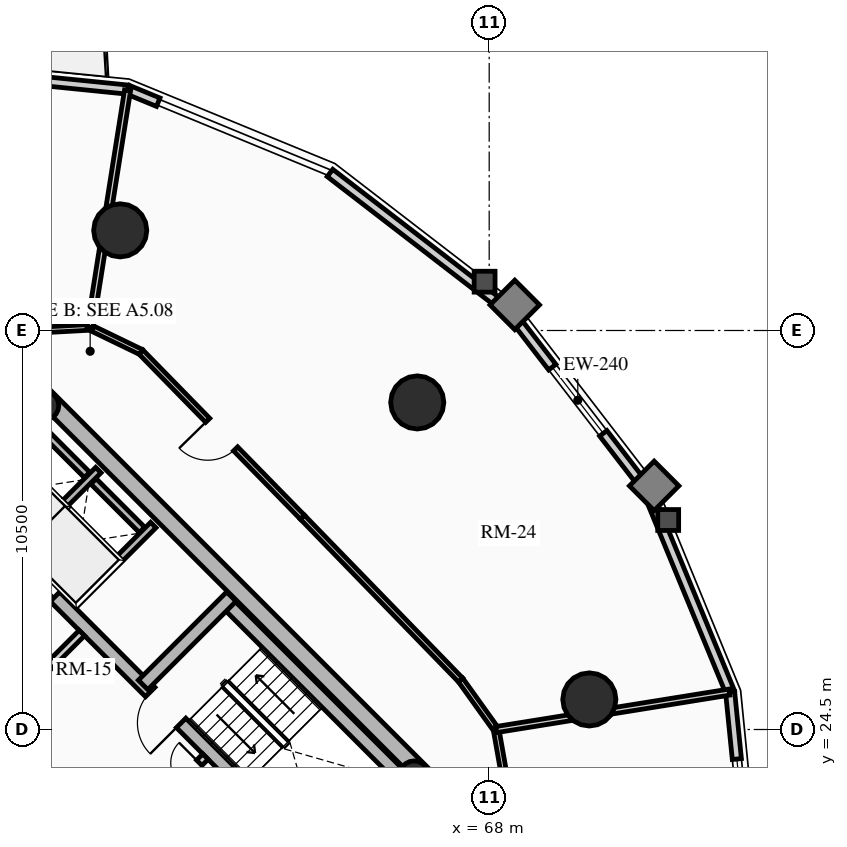
"""IFC4 building model, lengths in metres.
Left out: names, types, materials, properties, quantities, classifications, styles, units other than length and angle.
Written with IfcOpenShell. Run it as: python <this file> out.ifc"""

import sys

from ifc_helpers import new_model, si_unit, direction, frame, frame_2d, origin, origin_2d, place, context, subcontext, project, spatial, rectangle, circle, hollow_circle, extrude, source, transform, mapped, element, fill, save


model = new_model("IFC4")
c1 = context("Model", 3, precision=1e-05, world=origin(), true_north=direction((0.0, 1.0)))
c2 = subcontext(c1, "Body", "Model", "MODEL_VIEW")
j1 = project(units=[si_unit("LENGTHUNIT", "METRE"), si_unit("PLANEANGLEUNIT", "RADIAN")], contexts=[c1])
p1 = place(None, origin())
s1 = spatial("IfcSite", under=j1, at=p1, CompositionType="ELEMENT")
p2 = place(p1, origin())
s2 = spatial("IfcBuilding", under=s1, at=p2, CompositionType="ELEMENT")
p3 = place(p2, frame((0.0, 0.0, 75.97)))
s3 = spatial("IfcBuildingStorey", under=s2, at=p3, CompositionType="ELEMENT", Elevation=75.97)
for number, where, z_axis, x_axis in (
    (1, (58.737, 15.697, 0.0), (0.0, 0.0, 1.0), (-0.707, 0.707, 0.0)),
    (2, (66.303, 23.263, 0.0), (0.0, 0.0, 1.0), (-0.707, 0.707, 0.0)),
):
    element("IfcWall", number, at=place(p3, frame(where, z_axis=z_axis, x_axis=x_axis)), inside=s3, PredefinedType="SHEAR", context=c2, shape_type="SweptSolid", body=[
        extrude(rectangle(XDim=14.2, YDim=0.45, at=frame_2d((7.1, 0.0))), origin(), (0.0, 0.0, 1.0), 2.91),
    ])
p4 = place(p3, frame((58.578, 15.856, 0.0), z_axis=(0.0, 0.0, 1.0), x_axis=(0.707106781187, 0.707106781187, 0.0)))
e3 = element("IfcWall", 3, at=p4, inside=s3, PredefinedType="SHEAR", context=c2, shape_type="SweptSolid", body=[
    extrude(rectangle(XDim=10.7, YDim=0.45, at=frame_2d((5.35, 0.0))), origin(), (0.0, 0.0, 1.0), 2.91),
])
m1 = source(origin(), c2, "Body", "SweptSolid", [
    extrude(rectangle(XDim=1.5, YDim=2.02, at=frame_2d((0.75, 1.01))), frame((0.0, 0.235, 0.0), z_axis=(0.0, -1.0, 0.0), x_axis=(1.0, 0.0, 0.0)), (0.0, 0.0, 1.0), 0.47),
])
p5 = place(p4, frame((5.45, 0.0, 0.0)))
e4 = element("IfcOpeningElement", 4, at=p5, cuts=e3, PredefinedType="OPENING", context=c2, shape_type="MappedRepresentation", body=[
    mapped(m1, transform((0.0, 0.0, 0.0), x_axis=(1.0, 0.0, 0.0), y_axis=(0.0, 1.0, 0.0), z_axis=(0.0, 0.0, 1.0), scale=1.0)),
])
p6 = place(p3, frame((48.856, 25.578, 0.0), z_axis=(0.0, 0.0, 1.0), x_axis=(0.707106781187, 0.707106781187, 0.0)))
e5 = element("IfcWall", 5, at=p6, inside=s3, PredefinedType="SHEAR", context=c2, shape_type="SweptSolid", body=[
    extrude(rectangle(XDim=10.7, YDim=0.45, at=frame_2d((5.35, 0.0))), origin(), (0.0, 0.0, 1.0), 2.91),
])
p7 = place(p6, frame((4.6, 0.0, 0.0)))
e6 = element("IfcOpeningElement", 6, at=p7, cuts=e5, PredefinedType="OPENING", context=c2, shape_type="MappedRepresentation", body=[
    mapped(m1, transform((0.0, 0.0, 0.0), x_axis=(1.0, 0.0, 0.0), y_axis=(0.0, 1.0, 0.0), z_axis=(0.0, 0.0, 1.0), scale=1.0)),
])
p8 = place(p3, frame((61.078, 18.355, 0.0), z_axis=(0.0, 0.0, 1.0), x_axis=(-0.707106781187, 0.707106781187, 0.0)))
e7 = element("IfcWall", 7, at=p8, inside=s3, PredefinedType="SHEAR", context=c2, shape_type="SweptSolid", body=[
    extrude(rectangle(XDim=13.75, YDim=0.35, at=frame_2d((6.875, 0.0))), origin(), (0.0, 0.0, 1.0), 2.91),
])
m2 = source(origin(), c2, "Body", "SweptSolid", [
    extrude(rectangle(XDim=1.1, YDim=2.015, at=frame_2d((0.55, 1.007))), frame((0.0, 0.185, 0.0), z_axis=(0.0, -1.0, 0.0), x_axis=(1.0, 0.0, 0.0)), (0.0, 0.0, 1.0), 0.37),
])
p9 = place(p8, frame((4.875, 0.0, 0.0)))
e8 = element("IfcOpeningElement", 8, at=p9, cuts=e7, PredefinedType="OPENING", context=c2, shape_type="MappedRepresentation", body=[
    mapped(m2, transform((0.0, 0.0, 0.0), x_axis=(1.0, 0.0, 0.0), y_axis=(0.0, 1.0, 0.0), z_axis=(0.0, 0.0, 1.0), scale=1.0)),
])
m3 = source(origin(), c2, "Body", "SweptSolid", [
    extrude(rectangle(XDim=1.15, YDim=2.02, at=frame_2d((0.575, 1.01))), frame((0.0, 0.185, 0.0), z_axis=(0.0, -1.0, 0.0), x_axis=(1.0, 0.0, 0.0)), (0.0, 0.0, 1.0), 0.37),
])
p10 = place(p8, frame((7.295, 0.0, 0.0)))
e9 = element("IfcOpeningElement", 9, at=p10, cuts=e7, PredefinedType="OPENING", context=c2, shape_type="MappedRepresentation", body=[
    mapped(m3, transform((0.0, 0.0, 0.0), x_axis=(1.0, 0.0, 0.0), y_axis=(0.0, 1.0, 0.0), z_axis=(0.0, 0.0, 1.0), scale=1.0)),
])
p11 = place(p3, frame((63.645, 20.922, 0.0), z_axis=(0.0, 0.0, 1.0), x_axis=(-0.707106781187, 0.707106781187, 0.0)))
e10 = element("IfcWall", 10, at=p11, inside=s3, PredefinedType="SHEAR", context=c2, shape_type="SweptSolid", body=[
    extrude(rectangle(XDim=13.75, YDim=0.35, at=frame_2d((6.875, 0.0))), origin(), (0.0, 0.0, 1.0), 2.91),
])
p12 = place(p11, frame((10.0, 0.0, 0.0)))
e11 = element("IfcOpeningElement", 11, at=p12, cuts=e10, PredefinedType="OPENING", context=c2, shape_type="MappedRepresentation", body=[
    mapped(m2, transform((0.0, 0.0, 0.0), x_axis=(1.0, 0.0, 0.0), y_axis=(0.0, 1.0, 0.0), z_axis=(0.0, 0.0, 1.0), scale=1.0)),
])
p13 = place(p11, frame((12.0, 0.0, 0.0)))
e12 = element("IfcOpeningElement", 12, at=p13, cuts=e10, PredefinedType="OPENING", context=c2, shape_type="MappedRepresentation", body=[
    mapped(m2, transform((0.0, 0.0, 0.0), x_axis=(1.0, 0.0, 0.0), y_axis=(0.0, 1.0, 0.0), z_axis=(0.0, 0.0, 1.0), scale=1.0)),
])
p14 = place(p11, frame((5.305, 0.0, 0.0)))
e13 = element("IfcOpeningElement", 13, at=p14, cuts=e10, PredefinedType="OPENING", context=c2, shape_type="MappedRepresentation", body=[
    mapped(m3, transform((0.0, 0.0, 0.0), x_axis=(1.0, 0.0, 0.0), y_axis=(0.0, 1.0, 0.0), z_axis=(0.0, 0.0, 1.0), scale=1.0)),
])
p15 = place(p3, frame((65.83, 23.107, 0.0), z_axis=(0.0, 0.0, 1.0), x_axis=(-0.707088616009, 0.707124945897, 0.0)))
e14 = element("IfcWall", 14, at=p15, inside=s3, PredefinedType="SHEAR", context=c2, shape_type="SweptSolid", body=[
    extrude(rectangle(XDim=6.72, YDim=0.35, at=frame_2d((3.36, 0.0))), origin(), (0.0, 0.0, 1.0), 2.91),
])
p16 = place(p3, frame((58.893, 25.674, 0.0), z_axis=(0.0, 0.0, 1.0), x_axis=(0.707106781187, 0.707106781187, 0.0)))
e15 = element("IfcWall", 15, at=p16, inside=s3, PredefinedType="SHEAR", context=c2, shape_type="SweptSolid", body=[
    extrude(rectangle(XDim=3.285, YDim=0.35, at=frame_2d((1.643, 0.0))), origin(), (0.0, 0.0, 1.0), 2.91),
])
for number, where, z_axis, x_axis in (
    (16, (66.024, 23.294, 0.0), (0.0, 0.0, 1.0), (0.707, 0.707, 0.0)),
    (17, (56.294, 33.024, 0.0), (0.0, 0.0, 1.0), (0.707, 0.707, 0.0)),
):
    element("IfcColumn", number, at=place(p3, frame(where, z_axis=z_axis, x_axis=x_axis)), inside=s3, PredefinedType="COLUMN", context=c2, shape_type="SweptSolid", body=[
        extrude(hollow_circle(Radius=0.38, WallThickness=0.032, at=origin_2d()), origin(), (0.0, 0.0, 1.0), 2.91),
    ])
for number, where, z_axis, x_axis in (
    (18, (66.107, 33.107, 0.0), (0.0, 0.0, 1.0), (1.0, 0.0, 0.0)),
    (19, (58.291, 37.635, 0.0), (0.0, 0.0, 1.0), (1.0, 0.0, 0.0)),
    (20, (70.635, 25.291, 0.0), (0.0, 0.0, 1.0), (1.0, 0.0, 0.0)),
):
    element("IfcColumn", number, at=place(p3, frame(where, z_axis=z_axis, x_axis=x_axis)), inside=s3, PredefinedType="USERDEFINED", context=c2, shape_type="SweptSolid", body=[
        extrude(circle(Radius=0.7, at=origin_2d()), origin(), (0.0, 0.0, 1.0), 2.91),
    ])
p17 = place(p3, frame((63.811, 39.145, 0.0), z_axis=(0.0, 0.0, 1.0), x_axis=(0.791982052206, -0.61054437102, 0.0)))
e21 = element("IfcWall", 21, at=p17, inside=s3, PredefinedType="SOLIDWALL", context=c2, shape_type="SweptSolid", body=[
    extrude(rectangle(XDim=5.942, YDim=0.24, at=frame_2d((2.971, 0.0))), origin(), (0.0, 0.0, 1.0), 2.179),
])
p18 = place(p3, frame((58.487, 41.339, 0.0), z_axis=(0.0, 0.0, 1.0), x_axis=(0.924556017656, -0.381046152345, 0.0)))
e22 = element("IfcWall", 22, at=p18, inside=s3, PredefinedType="SOLIDWALL", context=c2, shape_type="SweptSolid", body=[
    extrude(rectangle(XDim=0.87, YDim=0.24, at=frame_2d((0.435, 0.0))), origin(), (0.0, 0.0, 1.0), 2.179),
])
p19 = place(p3, frame((53.067, 41.885, 0.0), z_axis=(0.0, 0.0, 1.0), x_axis=(0.994971754311, -0.10015591906, 0.0)))
e23 = element("IfcWall", 23, at=p19, inside=s3, PredefinedType="SOLIDWALL", context=c2, shape_type="SweptSolid", body=[
    extrude(rectangle(XDim=5.448, YDim=0.24, at=frame_2d((2.724, 0.0))), origin(), (0.0, 0.0, 1.0), 2.179),
])
m4 = source(origin(), c2, "Body", "SweptSolid", [
    extrude(rectangle(XDim=1.15, YDim=2.005, at=frame_2d((0.575, 1.002))), frame((0.0, 0.13, 0.0), z_axis=(0.0, -1.0, 0.0), x_axis=(1.0, 0.0, 0.0)), (0.0, 0.0, 1.0), 0.26),
])
p20 = place(p19, frame((2.149, 0.0, 0.0)))
e24 = element("IfcOpeningElement", 24, at=p20, cuts=e23, PredefinedType="OPENING", context=c2, shape_type="MappedRepresentation", body=[
    mapped(m4, transform((0.0, 0.0, 0.0), x_axis=(1.0, 0.0, 0.0), y_axis=(0.0, 1.0, 0.0), z_axis=(0.0, 0.0, 1.0), scale=1.0)),
])
p21 = place(p3, frame((74.339, 25.487, 0.0), z_axis=(0.0, 0.0, 1.0), x_axis=(0.10015591906, -0.994971754311, 0.0)))
e25 = element("IfcWall", 25, at=p21, inside=s3, PredefinedType="SOLIDWALL", context=c2, shape_type="SweptSolid", body=[
    extrude(rectangle(XDim=5.448, YDim=0.24, at=frame_2d((2.724, 0.0))), origin(), (0.0, 0.0, 1.0), 2.179),
])
m5 = source(origin(), c2, "Body", "SweptSolid", [
    extrude(rectangle(XDim=1.9, YDim=1.35, at=frame_2d((0.95, 0.675))), frame((0.0, 0.13, 0.0), z_axis=(0.0, -1.0, 0.0), x_axis=(1.0, 0.0, 0.0)), (0.0, 0.0, 1.0), 0.26),
])
p22 = place(p21, frame((1.774, 0.0, 0.65)))
e26 = element("IfcOpeningElement", 26, at=p22, cuts=e25, PredefinedType="OPENING", context=c2, shape_type="MappedRepresentation", body=[
    mapped(m5, transform((0.0, 0.0, 0.0), x_axis=(1.0, 0.0, 0.0), y_axis=(0.0, 1.0, 0.0), z_axis=(0.0, 0.0, 1.0), scale=1.0)),
])
p23 = place(p3, frame((72.145, 30.811, 0.0), z_axis=(0.0, 0.0, 1.0), x_axis=(0.381027003055, -0.924563909604, 0.0)))
e27 = element("IfcWall", 27, at=p23, inside=s3, PredefinedType="SOLIDWALL", context=c2, shape_type="SweptSolid", body=[
    extrude(rectangle(XDim=5.758, YDim=0.24, at=frame_2d((2.879, 0.0))), origin(), (0.0, 0.0, 1.0), 2.179),
])
p24 = place(p3, frame((68.517, 35.517, 0.0), z_axis=(0.0, 0.0, 1.0), x_axis=(0.61054437102, -0.791982052206, 0.0)))
e28 = element("IfcWall", 28, at=p24, inside=s3, PredefinedType="SOLIDWALL", context=c2, shape_type="SweptSolid", body=[
    extrude(rectangle(XDim=5.942, YDim=0.24, at=frame_2d((2.971, 0.0))), origin(), (0.0, 0.0, 1.0), 2.179),
])
m6 = source(origin(), c2, "Body", "SweptSolid", [
    extrude(rectangle(XDim=2.2, YDim=1.35, at=frame_2d((1.1, 0.675))), frame((0.0, 0.13, 0.0), z_axis=(0.0, -1.0, 0.0), x_axis=(1.0, 0.0, 0.0)), (0.0, 0.0, 1.0), 0.26),
])
p25 = place(p24, frame((1.871, 0.0, 0.65)))
e29 = element("IfcOpeningElement", 29, at=p25, cuts=e28, PredefinedType="OPENING", context=c2, shape_type="MappedRepresentation", body=[
    mapped(m6, transform((0.0, 0.0, 0.0), x_axis=(1.0, 0.0, 0.0), y_axis=(0.0, 1.0, 0.0), z_axis=(0.0, 0.0, 1.0), scale=1.0)),
])
p26 = place(p3, frame((57.062, 27.781, 0.0), z_axis=(0.0, 0.0, 1.0), x_axis=(0.707106781187, 0.707106781187, 0.0)))
e30 = element("IfcWall", 30, at=p26, inside=s3, PredefinedType="SHEAR", context=c2, shape_type="SweptSolid", body=[
    extrude(rectangle(XDim=2.97, YDim=0.2, at=frame_2d((1.485, 0.0))), origin(), (0.0, 0.0, 1.0), 2.91),
])
p27 = place(p3, frame((55.615, 29.227, 0.0), z_axis=(0.0, 0.0, 1.0), x_axis=(0.707147878904, 0.70706568108, 0.0)))
e31 = element("IfcWall", 31, at=p27, inside=s3, PredefinedType="SHEAR", context=c2, shape_type="SweptSolid", body=[
    extrude(rectangle(XDim=2.97, YDim=0.2, at=frame_2d((1.485, 0.0))), origin(), (0.0, 0.0, 1.0), 2.91),
])
p28 = place(p3, frame((58.865, 29.754, 0.0), z_axis=(0.0, 0.0, 1.0), x_axis=(-0.707174411312, 0.707039144592, 0.0)))
e32 = element("IfcWall", 32, at=p28, inside=s3, PredefinedType="SHEAR", context=c2, shape_type="SweptSolid", body=[
    extrude(rectangle(XDim=1.805, YDim=0.2, at=frame_2d((0.902, 0.0))), origin(), (0.0, 0.0, 1.0), 2.91),
])
p29 = place(p3, frame((57.419, 31.2, 0.0), z_axis=(0.0, 0.0, 1.0), x_axis=(-0.707032117043, 0.707181437447, 0.0)))
e33 = element("IfcWall", 33, at=p29, inside=s3, PredefinedType="SHEAR", context=c2, shape_type="SweptSolid", body=[
    extrude(rectangle(XDim=1.635, YDim=0.2, at=frame_2d((0.817, 0.0))), origin(), (0.0, 0.0, 1.0), 2.91),
])
p30 = place(p3, frame((58.214, 21.467, 0.0), z_axis=(0.0, 0.0, 1.0), x_axis=(0.707106781187, 0.707106781187, 0.0)))
e34 = element("IfcWall", 34, at=p30, inside=s3, PredefinedType="PARTITIONING", context=c2, shape_type="SweptSolid", body=[
    extrude(rectangle(XDim=3.28, YDim=0.2, at=frame_2d((1.64, 0.0))), origin(), (0.0, 0.0, 1.0), 2.655),
])
m7 = source(origin(), c2, "Body", "SweptSolid", [
    extrude(rectangle(XDim=1.5, YDim=2.02, at=frame_2d((0.75, 1.01))), frame((0.0, 0.11, 0.0), z_axis=(0.0, -1.0, 0.0), x_axis=(1.0, 0.0, 0.0)), (0.0, 0.0, 1.0), 0.22),
])
p31 = place(p30, frame((1.55, 0.0, 0.0)))
e35 = element("IfcOpeningElement", 35, at=p31, cuts=e34, PredefinedType="OPENING", context=c2, shape_type="MappedRepresentation", body=[
    mapped(m7, transform((0.0, 0.0, 0.0), x_axis=(1.0, 0.0, 0.0), y_axis=(0.0, 1.0, 0.0), z_axis=(0.0, 0.0, 1.0), scale=1.0)),
])
p32 = place(p3, frame((54.961, 24.719, 0.0), z_axis=(0.0, 0.0, 1.0), x_axis=(0.707106781187, 0.707106781187, 0.0)))
e36 = element("IfcWall", 36, at=p32, inside=s3, PredefinedType="PARTITIONING", context=c2, shape_type="SweptSolid", body=[
    extrude(rectangle(XDim=3.28, YDim=0.2, at=frame_2d((1.64, 0.0))), origin(), (0.0, 0.0, 1.0), 2.655),
])
m8 = source(origin(), c2, "Body", "SweptSolid", [
    extrude(rectangle(XDim=0.9, YDim=2.005, at=frame_2d((0.45, 1.002))), frame((0.0, 0.11, 0.0), z_axis=(0.0, -1.0, 0.0), x_axis=(1.0, 0.0, 0.0)), (0.0, 0.0, 1.0), 0.22),
])
p33 = place(p32, frame((0.16, 0.0, 0.0)))
e37 = element("IfcOpeningElement", 37, at=p33, cuts=e36, PredefinedType="OPENING", context=c2, shape_type="MappedRepresentation", body=[
    mapped(m8, transform((0.0, 0.0, 0.0), x_axis=(1.0, 0.0, 0.0), y_axis=(0.0, 1.0, 0.0), z_axis=(0.0, 0.0, 1.0), scale=1.0)),
])
p34 = place(p3, frame((63.086, 30.086, 0.0), z_axis=(0.0, 0.0, 1.0), x_axis=(-0.699032802832, 0.715089603172, 0.0)))
e38 = element("IfcWall", 38, at=p34, inside=s3, PredefinedType="PARTITIONING", context=c2, shape_type="SweptSolid", body=[
    extrude(rectangle(XDim=6.082, YDim=0.15, at=frame_2d((3.041, 0.0))), origin(), (0.0, 0.0, 1.0), 2.225),
])
m9 = source(origin(), c2, "Body", "SweptSolid", [
    extrude(rectangle(XDim=1.05, YDim=2.015, at=frame_2d((0.525, 1.007))), frame((0.0, 0.085, 0.0), z_axis=(0.0, -1.0, 0.0), x_axis=(1.0, 0.0, 0.0)), (0.0, 0.0, 1.0), 0.17),
])
p35 = place(p34, frame((2.516, 0.0, 0.0)))
e39 = element("IfcOpeningElement", 39, at=p35, cuts=e38, PredefinedType="OPENING", context=c2, shape_type="MappedRepresentation", body=[
    mapped(m9, transform((0.0, 0.0, 0.0), x_axis=(1.0, 0.0, 0.0), y_axis=(0.0, 1.0, 0.0), z_axis=(0.0, 0.0, 1.0), scale=1.0)),
])
p36 = place(p3, frame((58.835, 34.435, 0.0), z_axis=(0.0, 0.0, 1.0), x_axis=(-0.900352167336, 0.4351620098, 0.0)))
e40 = element("IfcWall", 40, at=p36, inside=s3, PredefinedType="PARTITIONING", context=c2, shape_type="SweptSolid", body=[
    extrude(rectangle(XDim=1.488, YDim=0.15, at=frame_2d((0.744, 0.0))), origin(), (0.0, 0.0, 1.0), 2.225),
])
p37 = place(p3, frame((57.495, 35.083, 0.0), z_axis=(0.0, 0.0, 1.0), x_axis=(-0.998536503254, -0.054081897798, 0.0)))
e41 = element("IfcWall", 41, at=p37, inside=s3, PredefinedType="PARTITIONING", context=c2, shape_type="SweptSolid", body=[
    extrude(rectangle(XDim=1.481, YDim=0.15, at=frame_2d((0.74, 0.0))), origin(), (0.0, 0.0, 1.0), 2.225),
])
p38 = place(p3, frame((68.423, 23.142, 0.0), z_axis=(0.0, 0.0, 1.0), x_axis=(-0.174796562349, 0.984604571283, 0.0)))
e42 = element("IfcWall", 42, at=p38, inside=s3, PredefinedType="PARTITIONING", context=c2, shape_type="SweptSolid", body=[
    extrude(rectangle(XDim=1.377, YDim=0.15, at=frame_2d((0.688, 0.0))), origin(), (0.0, 0.0, 1.0), 2.225),
])
p39 = place(p3, frame((68.182, 24.498, 0.0), z_axis=(0.0, 0.0, 1.0), x_axis=(-0.582532339525, 0.812807525437, 0.0)))
e43 = element("IfcWall", 43, at=p39, inside=s3, PredefinedType="PARTITIONING", context=c2, shape_type="SweptSolid", body=[
    extrude(rectangle(XDim=1.605, YDim=0.15, at=frame_2d((0.803, 0.0))), origin(), (0.0, 0.0, 1.0), 2.225),
])
p40 = place(p3, frame((67.247, 25.802, 0.0), z_axis=(0.0, 0.0, 1.0), x_axis=(-0.696771261687, 0.71729339108, 0.0)))
e44 = element("IfcWall", 44, at=p40, inside=s3, PredefinedType="PARTITIONING", context=c2, shape_type="SweptSolid", body=[
    extrude(rectangle(XDim=5.972, YDim=0.15, at=frame_2d((2.986, 0.0))), origin(), (0.0, 0.0, 1.0), 2.655),
])
p41 = place(p3, frame((57.495, 35.083, 0.0), z_axis=(0.0, 0.0, 1.0), x_axis=(0.156619688156, 0.987658986332, 0.0)))
e45 = element("IfcWall", 45, at=p41, inside=s3, PredefinedType="PARTITIONING", context=c2, shape_type="SweptSolid", body=[
    extrude(rectangle(XDim=6.315, YDim=0.16, at=frame_2d((3.157, 0.0))), origin(), (0.0, 0.0, 1.0), 2.179),
])
p42 = place(p3, frame((68.182, 24.498, 0.0), z_axis=(0.0, 0.0, 1.0), x_axis=(0.987330591038, 0.158676727973, 0.0)))
e46 = element("IfcWall", 46, at=p42, inside=s3, PredefinedType="PARTITIONING", context=c2, shape_type="SweptSolid", body=[
    extrude(rectangle(XDim=6.216, YDim=0.16, at=frame_2d((3.108, 0.0))), origin(), (0.0, 0.0, 1.0), 2.179),
])
m10 = source(origin(), c2, "Body", "SweptSolid", [
    extrude(rectangle(XDim=1.9, YDim=1.35, at=frame_2d((0.95, 0.675))), frame((0.0, 0.03, 0.0), z_axis=(0.0, -1.0, 0.0), x_axis=(1.0, 0.0, 0.0)), (0.0, 0.0, 1.0), 0.06),
])
p43 = place(p22, origin())
e47 = element("IfcWindow", 47, at=p43, inside=s3, PartitioningType="DOUBLE_PANEL_VERTICAL", PredefinedType="WINDOW", context=c2, shape_type="MappedRepresentation", body=[
    mapped(m10, transform((0.0, 0.0, 0.0), x_axis=(1.0, 0.0, 0.0), y_axis=(0.0, 1.0, 0.0), z_axis=(0.0, 0.0, 1.0), scale=1.0)),
])
fill(e26, e47)
m11 = source(origin(), c2, "Body", "SweptSolid", [
    extrude(rectangle(XDim=2.2, YDim=1.35, at=frame_2d((1.1, 0.675))), frame((0.0, 0.03, 0.0), z_axis=(0.0, -1.0, 0.0), x_axis=(1.0, 0.0, 0.0)), (0.0, 0.0, 1.0), 0.06),
])
p44 = place(p25, origin())
e48 = element("IfcWindow", 48, at=p44, inside=s3, PartitioningType="DOUBLE_PANEL_VERTICAL", PredefinedType="WINDOW", context=c2, shape_type="MappedRepresentation", body=[
    mapped(m11, transform((0.0, 0.0, 0.0), x_axis=(1.0, 0.0, 0.0), y_axis=(0.0, 1.0, 0.0), z_axis=(0.0, 0.0, 1.0), scale=1.0)),
])
fill(e29, e48)
m12 = source(origin(), c2, "Body", "SweptSolid", [
    extrude(rectangle(XDim=1.1, YDim=2.015, at=frame_2d((0.55, 1.007))), frame((0.0, 0.025, 0.0), z_axis=(0.0, -1.0, 0.0), x_axis=(1.0, 0.0, 0.0)), (0.0, 0.0, 1.0), 0.05),
])
p45 = place(p12, origin())
e49 = element("IfcDoor", 49, at=p45, inside=s3, OperationType="SLIDING_TO_LEFT", PredefinedType="DOOR", context=c2, shape_type="MappedRepresentation", body=[
    mapped(m12, transform((0.0, 0.0, 0.0), x_axis=(1.0, 0.0, 0.0), y_axis=(0.0, 1.0, 0.0), z_axis=(0.0, 0.0, 1.0), scale=1.0)),
])
fill(e11, e49)
m13 = source(origin(), c2, "Body", "SweptSolid", [
    extrude(rectangle(XDim=1.15, YDim=2.02, at=frame_2d((0.575, 1.01))), frame((0.0, 0.025, 0.0), z_axis=(0.0, -1.0, 0.0), x_axis=(1.0, 0.0, 0.0)), (0.0, 0.0, 1.0), 0.05),
])
p46 = place(p14, origin())
e50 = element("IfcDoor", 50, at=p46, inside=s3, OperationType="SINGLE_SWING_LEFT", PredefinedType="DOOR", context=c2, shape_type="MappedRepresentation", body=[
    mapped(m13, transform((0.0, 0.0, 0.0), x_axis=(1.0, 0.0, 0.0), y_axis=(0.0, 1.0, 0.0), z_axis=(0.0, 0.0, 1.0), scale=1.0)),
])
fill(e13, e50)
m14 = source(origin(), c2, "Body", "SweptSolid", [
    extrude(rectangle(XDim=1.5, YDim=2.02, at=frame_2d((0.75, 1.01))), frame((0.0, 0.025, 0.0), z_axis=(0.0, -1.0, 0.0), x_axis=(1.0, 0.0, 0.0)), (0.0, 0.0, 1.0), 0.05),
])
p47 = place(p31, origin())
e51 = element("IfcDoor", 51, at=p47, inside=s3, OperationType="DOUBLE_DOOR_SINGLE_SWING", PredefinedType="DOOR", context=c2, shape_type="MappedRepresentation", body=[
    mapped(m14, transform((0.0, 0.0, 0.0), x_axis=(1.0, 0.0, 0.0), y_axis=(0.0, 1.0, 0.0), z_axis=(0.0, 0.0, 1.0), scale=1.0)),
])
fill(e35, e51)
m15 = source(origin(), c2, "Body", "SweptSolid", [
    extrude(rectangle(XDim=1.05, YDim=2.015, at=frame_2d((0.525, 1.007))), frame((0.0, 0.025, 0.0), z_axis=(0.0, -1.0, 0.0), x_axis=(1.0, 0.0, 0.0)), (0.0, 0.0, 1.0), 0.05),
])
p48 = place(p35, origin())
e52 = element("IfcDoor", 52, at=p48, inside=s3, OperationType="SINGLE_SWING_RIGHT", PredefinedType="DOOR", context=c2, shape_type="MappedRepresentation", body=[
    mapped(m15, transform((0.0, 0.0, 0.0), x_axis=(1.0, 0.0, 0.0), y_axis=(0.0, 1.0, 0.0), z_axis=(0.0, 0.0, 1.0), scale=1.0)),
])
fill(e39, e52)
save(model, sys.argv[1])
